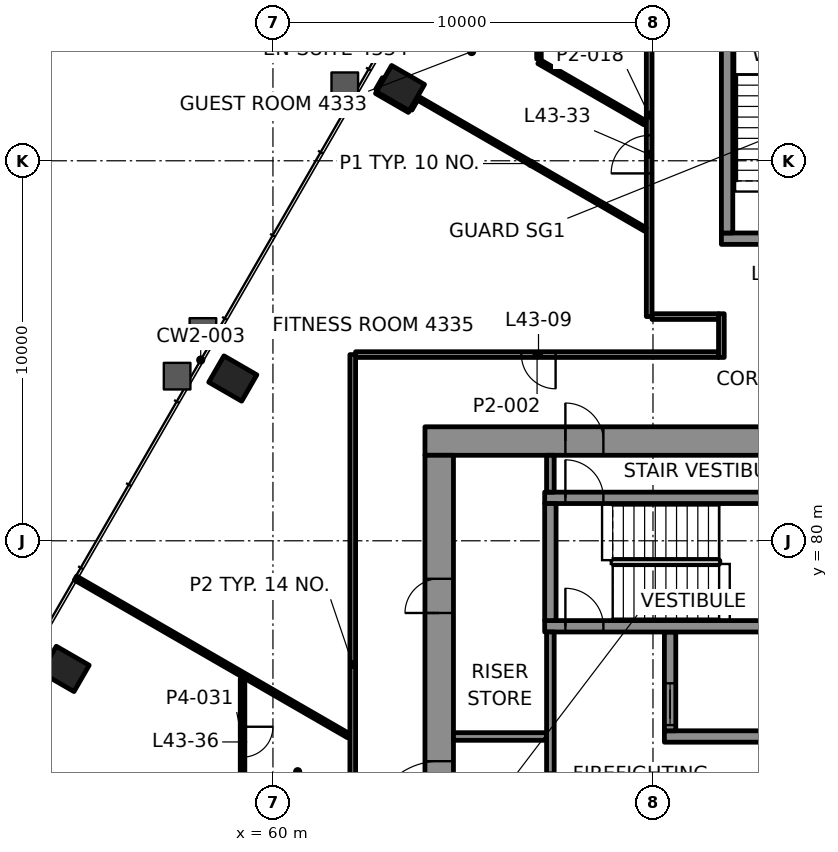
"""IFC4 building model, lengths in metres.
Left out: names, types, materials, properties, quantities, classifications, styles, units other than length and angle.
Written with IfcOpenShell. Run it as: python <this file> out.ifc"""

import sys

from ifc_helpers import new_model, si_unit, direction, frame, frame_2d, origin, origin_2d, place, context, subcontext, project, spatial, rectangle, hollow_rectangle, extrude, element, fill, save


model = new_model("IFC4")
c1 = context("Model", 3, precision=1e-05, world=origin(), true_north=direction((0.0, 1.0)))
c2 = subcontext(c1, "Body", "Model", "MODEL_VIEW")
j1 = project(units=[si_unit("LENGTHUNIT", "METRE"), si_unit("PLANEANGLEUNIT", "RADIAN")], contexts=[c1])
p1 = place(None, origin())
s1 = spatial("IfcSite", under=j1, at=p1, CompositionType="ELEMENT")
p2 = place(p1, origin())
s2 = spatial("IfcBuilding", under=s1, at=p2, CompositionType="ELEMENT")
p3 = place(p2, frame((0.0, 0.0, 187.0)))
s3 = spatial("IfcBuildingStorey", under=s2, at=p3, CompositionType="ELEMENT", Elevation=187.0)
for number, where, z_axis, x_axis in (
    (1, (63.355, 91.912, -0.0), (0.0, 0.0, 1.0), (-0.5, -0.866, 0.0)),
    (2, (58.944, 84.27, -0.0), (0.0, 0.0, 1.0), (-0.5, -0.866, 0.0)),
    (3, (54.532, 76.628, -0.0), (0.0, 0.0, 1.0), (-0.5, -0.866, 0.0)),
):
    element("IfcColumn", number, at=place(p3, frame(where, z_axis=z_axis, x_axis=x_axis)), inside=s3, PredefinedType="COLUMN", context=c2, shape_type="SweptSolid", body=[
        extrude(hollow_rectangle(XDim=0.8, YDim=1.0, WallThickness=0.05, at=origin_2d()), origin(), (0.0, 0.0, 1.0), 3.9),
    ])
p4 = place(p3, frame((64.0, 82.625, 0.0), z_axis=(0.0, 0.0, 1.0), x_axis=(1.0, 0.0, 0.0)))
e4 = element("IfcWall", 4, at=p4, inside=s3, PredefinedType="SHEAR", context=c2, shape_type="SweptSolid", body=[
    extrude(rectangle(XDim=22.0, YDim=0.75, at=frame_2d((11.0, 0.0))), origin(), (0.0, 0.0, 1.0), 3.7),
])
p5 = place(p4, frame((3.695, 0.0, 0.0)))
e5 = element("IfcOpeningElement", 5, at=p5, cuts=e4, PredefinedType="OPENING", context=c2, shape_type="SweptSolid", body=[
    extrude(rectangle(XDim=1.0, YDim=2.1, at=frame_2d((0.5, 1.05))), frame((0.0, 0.385, 0.0), z_axis=(0.0, -1.0, 0.0), x_axis=(1.0, 0.0, 0.0)), (0.0, 0.0, 1.0), 0.77),
])
p6 = place(p4, frame((17.505, 0.0, 0.0)))
e6 = element("IfcOpeningElement", 6, at=p6, cuts=e4, PredefinedType="OPENING", context=c2, shape_type="SweptSolid", body=[
    extrude(rectangle(XDim=1.0, YDim=2.1, at=frame_2d((0.5, 1.05))), frame((0.0, 0.385, 0.0), z_axis=(0.0, -1.0, 0.0), x_axis=(1.0, 0.0, 0.0)), (0.0, 0.0, 1.0), 0.77),
])
p7 = place(p4, frame((10.65, 0.0, 0.0)))
e7 = element("IfcOpeningElement", 7, at=p7, cuts=e4, PredefinedType="OPENING", context=c2, shape_type="SweptSolid", body=[
    extrude(rectangle(XDim=0.9, YDim=2.1, at=frame_2d((0.45, 1.05))), frame((0.0, 0.385, 0.0), z_axis=(0.0, -1.0, 0.0), x_axis=(1.0, 0.0, 0.0)), (0.0, 0.0, 1.0), 0.77),
])
p8 = place(p3, frame((64.375, 67.75, 0.0), z_axis=(0.0, 0.0, 1.0), x_axis=(0.0, 1.0, 0.0)))
e8 = element("IfcWall", 8, at=p8, inside=s3, PredefinedType="SHEAR", context=c2, shape_type="SweptSolid", body=[
    extrude(rectangle(XDim=14.5, YDim=0.75, at=frame_2d((7.25, 0.0))), origin(), (0.0, 0.0, 1.0), 3.7),
])
p9 = place(p8, frame((4.65, 0.0, 0.0)))
e9 = element("IfcOpeningElement", 9, at=p9, cuts=e8, PredefinedType="OPENING", context=c2, shape_type="SweptSolid", body=[
    extrude(rectangle(XDim=1.8, YDim=2.1, at=frame_2d((0.9, 1.05))), frame((0.0, 0.385, 0.0), z_axis=(0.0, -1.0, 0.0), x_axis=(1.0, 0.0, 0.0)), (0.0, 0.0, 1.0), 0.77),
])
p10 = place(p8, frame((2.55, 0.0, 0.0)))
e10 = element("IfcOpeningElement", 10, at=p10, cuts=e8, PredefinedType="OPENING", context=c2, shape_type="SweptSolid", body=[
    extrude(rectangle(XDim=0.9, YDim=2.1, at=frame_2d((0.45, 1.05))), frame((0.0, 0.385, 0.0), z_axis=(0.0, -1.0, 0.0), x_axis=(1.0, 0.0, 0.0)), (0.0, 0.0, 1.0), 0.77),
])
p11 = place(p8, frame((10.35, 0.0, 0.0)))
e11 = element("IfcOpeningElement", 11, at=p11, cuts=e8, PredefinedType="OPENING", context=c2, shape_type="SweptSolid", body=[
    extrude(rectangle(XDim=0.9, YDim=2.1, at=frame_2d((0.45, 1.05))), frame((0.0, 0.385, 0.0), z_axis=(0.0, -1.0, 0.0), x_axis=(1.0, 0.0, 0.0)), (0.0, 0.0, 1.0), 0.77),
])
p12 = place(p3, frame((70.3, 74.85, 0.0), z_axis=(0.0, 0.0, 1.0), x_axis=(1.0, 0.0, 0.0)))
e12 = element("IfcWall", 12, at=p12, inside=s3, PredefinedType="SHEAR", context=c2, shape_type="SweptSolid", body=[
    extrude(rectangle(XDim=14.3, YDim=0.3, at=frame_2d((7.15, 0.0))), origin(), (0.0, 0.0, 1.0), 3.7),
])
p13 = place(p12, frame((3.8, 0.0, 0.0)))
e13 = element("IfcOpeningElement", 13, at=p13, cuts=e12, PredefinedType="OPENING", context=c2, shape_type="SweptSolid", body=[
    extrude(rectangle(XDim=1.1, YDim=2.1, at=frame_2d((0.55, 1.05))), frame((0.0, 0.16, 0.0), z_axis=(0.0, -1.0, 0.0), x_axis=(1.0, 0.0, 0.0)), (0.0, 0.0, 1.0), 0.32),
])
p14 = place(p12, frame((12.2, 0.0, 0.0)))
e14 = element("IfcOpeningElement", 14, at=p14, cuts=e12, PredefinedType="OPENING", context=c2, shape_type="SweptSolid", body=[
    extrude(rectangle(XDim=1.1, YDim=2.1, at=frame_2d((0.55, 1.05))), frame((0.0, 0.16, 0.0), z_axis=(0.0, -1.0, 0.0), x_axis=(1.0, 0.0, 0.0)), (0.0, 0.0, 1.0), 0.32),
])
p15 = place(p3, frame((70.45, 75.0, 0.0), z_axis=(0.0, 0.0, 1.0), x_axis=(0.0, 1.0, 0.0)))
e15 = element("IfcWall", 15, at=p15, inside=s3, PredefinedType="SHEAR", context=c2, shape_type="SweptSolid", body=[
    extrude(rectangle(XDim=2.6, YDim=0.3, at=frame_2d((1.3, 0.0))), origin(), (0.0, 0.0, 1.0), 3.7),
])
p16 = place(p15, frame((0.15, 0.0, 0.0)))
e16 = element("IfcOpeningElement", 16, at=p16, cuts=e15, PredefinedType="OPENING", context=c2, shape_type="SweptSolid", body=[
    extrude(rectangle(XDim=1.1, YDim=2.1, at=frame_2d((0.55, 1.05))), frame((0.0, 0.16, 0.0), z_axis=(0.0, -1.0, 0.0), x_axis=(1.0, 0.0, 0.0)), (0.0, 0.0, 1.0), 0.32),
])
p17 = place(p3, frame((67.15, 77.75, 0.0), z_axis=(0.0, 0.0, 1.0), x_axis=(1.0, 0.0, 0.0)))
e17 = element("IfcWall", 17, at=p17, inside=s3, PredefinedType="SHEAR", context=c2, shape_type="SweptSolid", body=[
    extrude(rectangle(XDim=17.45, YDim=0.3, at=frame_2d((8.725, 0.0))), origin(), (0.0, 0.0, 1.0), 3.7),
])
p18 = place(p17, frame((0.545, 0.0, 0.0)))
e18 = element("IfcOpeningElement", 18, at=p18, cuts=e17, PredefinedType="OPENING", context=c2, shape_type="SweptSolid", body=[
    extrude(rectangle(XDim=1.0, YDim=2.1, at=frame_2d((0.5, 1.05))), frame((0.0, 0.16, 0.0), z_axis=(0.0, -1.0, 0.0), x_axis=(1.0, 0.0, 0.0)), (0.0, 0.0, 1.0), 0.32),
])
p19 = place(p3, frame((67.15, 81.13, 0.0), z_axis=(0.0, 0.0, 1.0), x_axis=(1.0, 0.0, 0.0)))
e19 = element("IfcWall", 19, at=p19, inside=s3, PredefinedType="SHEAR", context=c2, shape_type="SweptSolid", body=[
    extrude(rectangle(XDim=6.91, YDim=0.3, at=frame_2d((3.455, 0.0))), origin(), (0.0, 0.0, 1.0), 3.7),
])
p20 = place(p19, frame((0.545, 0.0, 0.0)))
e20 = element("IfcOpeningElement", 20, at=p20, cuts=e19, PredefinedType="OPENING", context=c2, shape_type="SweptSolid", body=[
    extrude(rectangle(XDim=1.0, YDim=2.1, at=frame_2d((0.5, 1.05))), frame((0.0, 0.16, 0.0), z_axis=(0.0, -1.0, 0.0), x_axis=(1.0, 0.0, 0.0)), (0.0, 0.0, 1.0), 0.32),
])
p21 = place(p3, frame((67.3, 77.9, 0.0), z_axis=(0.0, 0.0, 1.0), x_axis=(0.0, 1.0, 0.0)))
e21 = element("IfcWall", 21, at=p21, inside=s3, PredefinedType="SHEAR", context=c2, shape_type="SweptSolid", body=[
    extrude(rectangle(XDim=3.08, YDim=0.3, at=frame_2d((1.54, 0.0))), origin(), (0.0, 0.0, 1.0), 3.7),
])
p22 = place(p3, frame((71.8, 87.95, 0.0), z_axis=(0.0, 0.0, 1.0), x_axis=(1.0, 0.0, 0.0)))
e22 = element("IfcWall", 22, at=p22, inside=s3, PredefinedType="SHEAR", context=c2, shape_type="SweptSolid", body=[
    extrude(rectangle(XDim=6.4, YDim=0.3, at=frame_2d((3.2, 0.0))), origin(), (0.0, 0.0, 1.0), 3.7),
])
p23 = place(p22, frame((1.325, 0.0, 0.0)))
e23 = element("IfcOpeningElement", 23, at=p23, cuts=e22, PredefinedType="OPENING", context=c2, shape_type="SweptSolid", body=[
    extrude(rectangle(XDim=1.0, YDim=2.1, at=frame_2d((0.5, 1.05))), frame((0.0, 0.16, 0.0), z_axis=(0.0, -1.0, 0.0), x_axis=(1.0, 0.0, 0.0)), (0.0, 0.0, 1.0), 0.32),
])
p24 = place(p22, frame((4.125, 0.0, 0.0)))
e24 = element("IfcOpeningElement", 24, at=p24, cuts=e22, PredefinedType="OPENING", context=c2, shape_type="SweptSolid", body=[
    extrude(rectangle(XDim=1.2, YDim=2.1, at=frame_2d((0.6, 1.05))), frame((0.0, 0.16, 0.0), z_axis=(0.0, -1.0, 0.0), x_axis=(1.0, 0.0, 0.0)), (0.0, 0.0, 1.0), 0.32),
])
p25 = place(p3, frame((71.95, 88.1, 0.0), z_axis=(0.0, 0.0, 1.0), x_axis=(0.0, 1.0, 0.0)))
e25 = element("IfcWall", 25, at=p25, inside=s3, PredefinedType="SHEAR", context=c2, shape_type="SweptSolid", body=[
    extrude(rectangle(XDim=6.2, YDim=0.3, at=frame_2d((3.1, 0.0))), origin(), (0.0, 0.0, 1.0), 3.7),
])
p26 = place(p3, frame((71.725, 84.9, 0.0), z_axis=(0.0, 0.0, 1.0), x_axis=(-1.0, 0.0, 0.0)))
e26 = element("IfcWall", 26, at=p26, inside=s3, PredefinedType="PARTITIONING", context=c2, shape_type="SweptSolid", body=[
    extrude(rectangle(XDim=9.55, YDim=0.15, at=frame_2d((4.775, 0.0))), origin(), (0.0, 0.0, 1.0), 3.1),
])
p27 = place(p26, frame((4.287, 0.0, 0.0)))
e27 = element("IfcOpeningElement", 27, at=p27, cuts=e26, PredefinedType="OPENING", context=c2, shape_type="SweptSolid", body=[
    extrude(rectangle(XDim=0.9, YDim=2.1, at=frame_2d((0.45, 1.05))), frame((0.0, 0.085, 0.0), z_axis=(0.0, -1.0, 0.0), x_axis=(1.0, 0.0, 0.0)), (0.0, 0.0, 1.0), 0.17),
])
p28 = place(p3, frame((69.976, 85.9, 0.0), z_axis=(0.0, 0.0, 1.0), x_axis=(1.0, 0.0, 0.0)))
e28 = element("IfcWall", 28, at=p28, inside=s3, PredefinedType="PARTITIONING", context=c2, shape_type="SweptSolid", body=[
    extrude(rectangle(XDim=1.75, YDim=0.15, at=frame_2d((0.875, 0.0))), origin(), (0.0, 0.0, 1.0), 3.1),
])
p29 = place(p3, frame((63.614, 91.359, 0.0), z_axis=(0.0, 0.0, 1.0), x_axis=(0.499557828523, 0.866280541142, 0.0)))
e29 = element("IfcWall", 29, at=p29, inside=s3, PredefinedType="PARTITIONING", context=c2, shape_type="SweptSolid", body=[
    extrude(rectangle(XDim=0.3, YDim=0.1, at=frame_2d((0.15, 0.0))), origin(), (0.0, 0.0, 1.0), 3.022),
])
p30 = place(p3, frame((62.748, 91.859, 0.0), z_axis=(0.0, 0.0, 1.0), x_axis=(0.500044870432, 0.865999496279, 0.0)))
e30 = element("IfcWall", 30, at=p30, inside=s3, PredefinedType="PARTITIONING", context=c2, shape_type="SweptSolid", body=[
    extrude(rectangle(XDim=0.35, YDim=0.1, at=frame_2d((0.175, 0.0))), origin(), (0.0, 0.0, 1.0), 3.1),
])
p31 = place(p3, frame((71.8, 84.825, 0.0), z_axis=(0.0, 0.0, 1.0), x_axis=(0.0, 1.0, 0.0)))
e31 = element("IfcWall", 31, at=p31, inside=s3, PredefinedType="PARTITIONING", context=c2, shape_type="SweptSolid", body=[
    extrude(rectangle(XDim=1.15, YDim=0.15, at=frame_2d((0.575, 0.0))), origin(), (0.0, 0.0, 1.0), 3.1),
])
p32 = place(p3, frame((69.9, 85.9, 0.0), z_axis=(0.0, 0.0, 1.0), x_axis=(0.0, 1.0, 0.0)))
e32 = element("IfcWall", 32, at=p32, inside=s3, PredefinedType="PARTITIONING", context=c2, shape_type="SweptSolid", body=[
    extrude(rectangle(XDim=10.6, YDim=0.15, at=frame_2d((5.3, 0.0))), origin(), (0.0, 0.0, 1.0), 3.022),
])
p33 = place(p32, frame((3.767, 0.0, 0.0)))
e33 = element("IfcOpeningElement", 33, at=p33, cuts=e32, PredefinedType="OPENING", context=c2, shape_type="SweptSolid", body=[
    extrude(rectangle(XDim=1.0, YDim=2.1, at=frame_2d((0.5, 1.05))), frame((0.0, 0.085, 0.0), z_axis=(0.0, -1.0, 0.0), x_axis=(1.0, 0.0, 0.0)), (0.0, 0.0, 1.0), 0.17),
])
p34 = place(p32, frame((8.412, 0.0, 0.0)))
e34 = element("IfcOpeningElement", 34, at=p34, cuts=e32, PredefinedType="OPENING", context=c2, shape_type="SweptSolid", body=[
    extrude(rectangle(XDim=0.9, YDim=2.1, at=frame_2d((0.45, 1.05))), frame((0.0, 0.085, 0.0), z_axis=(0.0, -1.0, 0.0), x_axis=(1.0, 0.0, 0.0)), (0.0, 0.0, 1.0), 0.17),
])
p35 = place(p3, frame((67.0, 94.747, 0.0), z_axis=(0.0, 0.0, 1.0), x_axis=(0.0, -1.0, 0.0)))
e35 = element("IfcWall", 35, at=p35, inside=s3, PredefinedType="PARTITIONING", context=c2, shape_type="SweptSolid", body=[
    extrude(rectangle(XDim=2.068, YDim=0.12, at=frame_2d((1.034, 0.0))), origin(), (0.0, 0.0, 1.0), 3.1),
])
p36 = place(p35, frame((0.634, 0.0, 0.0)))
e36 = element("IfcOpeningElement", 36, at=p36, cuts=e35, PredefinedType="OPENING", context=c2, shape_type="SweptSolid", body=[
    extrude(rectangle(XDim=0.8, YDim=2.1, at=frame_2d((0.4, 1.05))), frame((0.0, 0.07, 0.0), z_axis=(0.0, -1.0, 0.0), x_axis=(1.0, 0.0, 0.0)), (0.0, 0.0, 1.0), 0.14),
])
p37 = place(p3, frame((62.1, 68.591, 0.0), z_axis=(0.0, 0.0, 1.0), x_axis=(0.0, 1.0, 0.0)))
e37 = element("IfcWall", 37, at=p37, inside=s3, PredefinedType="PARTITIONING", context=c2, shape_type="SweptSolid", body=[
    extrude(rectangle(XDim=16.308, YDim=0.15, at=frame_2d((8.154, 0.0))), origin(), (0.0, 0.0, 1.0), 3.1),
])
p38 = place(p3, frame((59.2, 76.371, 0.0), z_axis=(0.0, 0.0, 1.0), x_axis=(0.0, -1.0, 0.0)))
e38 = element("IfcWall", 38, at=p38, inside=s3, PredefinedType="PARTITIONING", context=c2, shape_type="SweptSolid", body=[
    extrude(rectangle(XDim=3.329, YDim=0.12, at=frame_2d((1.665, 0.0))), origin(), (0.0, 0.0, 1.0), 3.1),
])
p39 = place(p38, frame((1.265, 0.0, 0.0)))
e39 = element("IfcOpeningElement", 39, at=p39, cuts=e38, PredefinedType="OPENING", context=c2, shape_type="SweptSolid", body=[
    extrude(rectangle(XDim=0.8, YDim=2.1, at=frame_2d((0.4, 1.05))), frame((0.0, 0.07, 0.0), z_axis=(0.0, -1.0, 0.0), x_axis=(1.0, 0.0, 0.0)), (0.0, 0.0, 1.0), 0.14),
])
p40 = place(p3, frame((69.79, 90.998, 0.0), z_axis=(0.0, 0.0, 1.0), x_axis=(-0.866029130051, 0.499993545862, 0.0)))
e40 = element("IfcWall", 40, at=p40, inside=s3, PredefinedType="PARTITIONING", context=c2, shape_type="SweptSolid", body=[
    extrude(rectangle(XDim=3.222, YDim=0.12, at=frame_2d((1.611, 0.0))), origin(), (0.0, 0.0, 1.0), 3.1),
])
p41 = place(p3, frame((69.799, 88.192, 0.0), z_axis=(0.0, 0.0, 1.0), x_axis=(-0.866013353477, 0.500020871164, 0.0)))
e41 = element("IfcWall", 41, at=p41, inside=s3, PredefinedType="PARTITIONING", context=c2, shape_type="SweptSolid", body=[
    extrude(rectangle(XDim=6.94, YDim=0.1, at=frame_2d((3.47, 0.0))), origin(), (0.0, 0.0, 1.0), 3.022),
])
p42 = place(p3, frame((63.588, 91.316, 0.0), z_axis=(0.0, 0.0, 1.0), x_axis=(-0.866039090965, 0.499976292358, 0.0)))
e42 = element("IfcWall", 42, at=p42, inside=s3, PredefinedType="PARTITIONING", context=c2, shape_type="SweptSolid", body=[
    extrude(rectangle(XDim=0.999, YDim=0.1, at=frame_2d((0.5, 0.0))), origin(), (0.0, 0.0, 1.0), 3.022),
])
p43 = place(p3, frame((61.99, 74.869, 0.0), z_axis=(0.0, 0.0, 1.0), x_axis=(-0.866025877972, 0.499999178681, 0.0)))
e43 = element("IfcWall", 43, at=p43, inside=s3, PredefinedType="PARTITIONING", context=c2, shape_type="SweptSolid", body=[
    extrude(rectangle(XDim=8.299, YDim=0.12, at=frame_2d((4.149, 0.0))), origin(), (0.0, 0.0, 1.0), 3.022),
])
p44 = place(p3, frame((64.75, 74.85, 0.0), z_axis=(0.0, 0.0, 1.0), x_axis=(1.0, 0.0, 0.0)))
e44 = element("IfcWall", 44, at=p44, inside=s3, PredefinedType="PARTITIONING", context=c2, shape_type="SweptSolid", body=[
    extrude(rectangle(XDim=2.45, YDim=0.2, at=frame_2d((1.225, 0.0))), origin(), (0.0, 0.0, 1.0), 3.7),
])
p45 = place(p3, frame((67.3, 71.85, 0.0), z_axis=(0.0, 0.0, 1.0), x_axis=(0.0, 1.0, 0.0)))
e45 = element("IfcWall", 45, at=p45, inside=s3, PredefinedType="PARTITIONING", context=c2, shape_type="SweptSolid", body=[
    extrude(rectangle(XDim=5.75, YDim=0.2, at=frame_2d((2.875, 0.0))), origin(), (0.0, 0.0, 1.0), 3.7),
])
p46 = place(p45, frame((0.85, 0.0, 0.0)))
e46 = element("IfcOpeningElement", 46, at=p46, cuts=e45, PredefinedType="OPENING", context=c2, shape_type="SweptSolid", body=[
    extrude(rectangle(XDim=1.2, YDim=2.1, at=frame_2d((0.6, 1.05))), frame((0.0, 0.11, 0.0), z_axis=(0.0, -1.0, 0.0), x_axis=(1.0, 0.0, 0.0)), (0.0, 0.0, 1.0), 0.22),
])
p47 = place(p3, frame((67.3, 81.28, 0.0), z_axis=(0.0, 0.0, 1.0), x_axis=(0.0, 1.0, 0.0)))
e47 = element("IfcWall", 47, at=p47, inside=s3, PredefinedType="PARTITIONING", context=c2, shape_type="SweptSolid", body=[
    extrude(rectangle(XDim=0.97, YDim=0.2, at=frame_2d((0.485, 0.0))), origin(), (0.0, 0.0, 1.0), 3.7),
])
p48 = place(p27, origin())
e48 = element("IfcDoor", 48, at=p48, inside=s3, OperationType="SINGLE_SWING_LEFT", PredefinedType="DOOR", context=c2, shape_type="SweptSolid", body=[
    extrude(rectangle(XDim=0.9, YDim=2.1, at=frame_2d((0.45, 1.05))), frame((0.0, 0.025, 0.0), z_axis=(0.0, -1.0, 0.0), x_axis=(1.0, 0.0, 0.0)), (0.0, 0.0, 1.0), 0.05),
])
fill(e27, e48)
p49 = place(p33, origin())
e49 = element("IfcDoor", 49, at=p49, inside=s3, OperationType="SINGLE_SWING_RIGHT", PredefinedType="DOOR", context=c2, shape_type="SweptSolid", body=[
    extrude(rectangle(XDim=1.0, YDim=2.1, at=frame_2d((0.5, 1.05))), frame((0.0, 0.025, 0.0), z_axis=(0.0, -1.0, 0.0), x_axis=(1.0, 0.0, 0.0)), (0.0, 0.0, 1.0), 0.05),
])
fill(e33, e49)
p50 = place(p39, origin())
e50 = element("IfcDoor", 50, at=p50, inside=s3, OperationType="SINGLE_SWING_LEFT", PredefinedType="DOOR", context=c2, shape_type="SweptSolid", body=[
    extrude(rectangle(XDim=0.8, YDim=2.1, at=frame_2d((0.4, 1.05))), frame((0.0, 0.025, 0.0), z_axis=(0.0, -1.0, 0.0), x_axis=(1.0, 0.0, 0.0)), (0.0, 0.0, 1.0), 0.05),
])
fill(e39, e50)
p51 = place(p16, origin())
e51 = element("IfcDoor", 51, at=p51, inside=s3, OperationType="DOUBLE_DOOR_SLIDING", PredefinedType="DOOR", context=c2, shape_type="SweptSolid", body=[
    extrude(rectangle(XDim=1.1, YDim=2.1, at=frame_2d((0.55, 1.05))), frame((0.0, 0.025, 0.0), z_axis=(0.0, -1.0, 0.0), x_axis=(1.0, 0.0, 0.0)), (0.0, 0.0, 1.0), 0.05),
])
fill(e16, e51)
p52 = place(p18, origin())
e52 = element("IfcDoor", 52, at=p52, inside=s3, OperationType="SINGLE_SWING_LEFT", PredefinedType="DOOR", context=c2, shape_type="SweptSolid", body=[
    extrude(rectangle(XDim=1.0, YDim=2.1, at=frame_2d((0.5, 1.05))), frame((0.0, 0.025, 0.0), z_axis=(0.0, -1.0, 0.0), x_axis=(1.0, 0.0, 0.0)), (0.0, 0.0, 1.0), 0.05),
])
fill(e18, e52)
p53 = place(p20, origin())
e53 = element("IfcDoor", 53, at=p53, inside=s3, OperationType="SINGLE_SWING_RIGHT", PredefinedType="DOOR", context=c2, shape_type="SweptSolid", body=[
    extrude(rectangle(XDim=1.0, YDim=2.1, at=frame_2d((0.5, 1.05))), frame((0.0, 0.025, 0.0), z_axis=(0.0, -1.0, 0.0), x_axis=(1.0, 0.0, 0.0)), (0.0, 0.0, 1.0), 0.05),
])
fill(e20, e53)
p54 = place(p5, origin())
e54 = element("IfcDoor", 54, at=p54, inside=s3, OperationType="SINGLE_SWING_LEFT", PredefinedType="DOOR", context=c2, shape_type="SweptSolid", body=[
    extrude(rectangle(XDim=1.0, YDim=2.1, at=frame_2d((0.5, 1.05))), frame((0.0, 0.095, 0.0), z_axis=(0.0, -1.0, 0.0), x_axis=(1.0, 0.0, 0.0)), (0.0, 0.0, 1.0), 0.19),
])
fill(e5, e54)
p55 = place(p46, origin())
e55 = element("IfcDoor", 55, at=p55, inside=s3, OperationType="SINGLE_SWING_RIGHT", PredefinedType="DOOR", context=c2, shape_type="SweptSolid", body=[
    extrude(rectangle(XDim=1.2, YDim=2.1, at=frame_2d((0.6, 1.05))), frame((0.0, 0.025, 0.0), z_axis=(0.0, -1.0, 0.0), x_axis=(1.0, 0.0, 0.0)), (0.0, 0.0, 1.0), 0.05),
])
fill(e46, e55)
p56 = place(p9, origin())
e56 = element("IfcDoor", 56, at=p56, inside=s3, OperationType="SINGLE_SWING_LEFT", PredefinedType="DOOR", context=c2, shape_type="SweptSolid", body=[
    extrude(rectangle(XDim=1.8, YDim=2.1, at=frame_2d((0.9, 1.05))), frame((0.0, 0.095, 0.0), z_axis=(0.0, -1.0, 0.0), x_axis=(1.0, 0.0, 0.0)), (0.0, 0.0, 1.0), 0.19),
])
fill(e9, e56)
p57 = place(p11, origin())
e57 = element("IfcDoor", 57, at=p57, inside=s3, OperationType="SINGLE_SWING_RIGHT", PredefinedType="DOOR", context=c2, shape_type="SweptSolid", body=[
    extrude(rectangle(XDim=0.9, YDim=2.1, at=frame_2d((0.45, 1.05))), frame((0.0, 0.095, 0.0), z_axis=(0.0, -1.0, 0.0), x_axis=(1.0, 0.0, 0.0)), (0.0, 0.0, 1.0), 0.19),
])
fill(e11, e57)
save(model, sys.argv[1])
